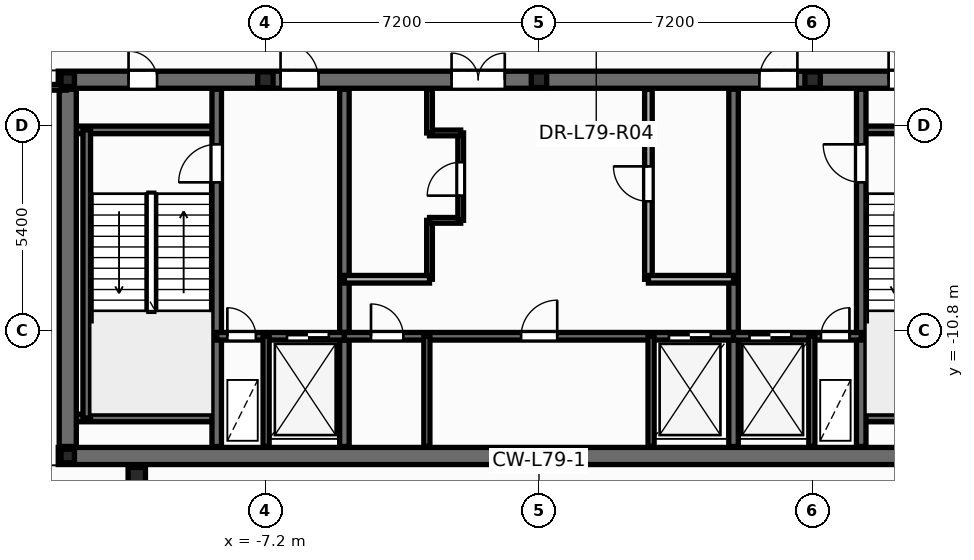
"""IFC4 building model, lengths in metres.
Left out: names, types, materials, properties, quantities, classifications, styles, units other than length and angle.
Written with IfcOpenShell. Run it as: python <this file> out.ifc"""

import sys

from ifc_helpers import new_model, si_unit, direction, frame, frame_2d, origin, origin_2d, place, context, subcontext, project, spatial, rectangle, hollow_circle, i_section, extrude, element, fill, save


model = new_model("IFC4")
c1 = context("Model", 3, precision=1e-05, world=origin(), true_north=direction((0.0, 1.0)))
c2 = subcontext(c1, "Body", "Model", "MODEL_VIEW")
j1 = project(units=[si_unit("LENGTHUNIT", "METRE"), si_unit("PLANEANGLEUNIT", "RADIAN")], contexts=[c1])
p1 = place(None, origin())
s1 = spatial("IfcSite", under=j1, at=p1, CompositionType="ELEMENT")
p2 = place(p1, origin())
s2 = spatial("IfcBuilding", under=s1, at=p2, CompositionType="ELEMENT")
p3 = place(p2, frame((0.0, 0.0, 301.8)))
s3 = spatial("IfcBuildingStorey", under=s2, at=p3, CompositionType="ELEMENT", Elevation=301.8)
p4 = place(p3, frame((-10.583, -14.63, 0.0), z_axis=(0.0, 0.0, 1.0), x_axis=(1.0, 0.0, 0.0)))
e1 = element("IfcColumn", 1, at=p4, inside=s3, PredefinedType="COLUMN", context=c2, shape_type="SweptSolid", body=[
    extrude(hollow_circle(Radius=0.229, WallThickness=0.016, at=origin_2d()), origin(), (0.0, 0.0, 1.0), 4.2),
])
for number, where, z_axis, x_axis in (
    (2, (-12.4, -14.1, 0.0), (0.0, 0.0, 1.0), (1.0, 0.0, 0.0)),
    (3, (-12.4, -4.2, 0.0), (0.0, 0.0, 1.0), (1.0, 0.0, 0.0)),
):
    element("IfcColumn", number, at=place(p3, frame(where, z_axis=z_axis, x_axis=x_axis)), inside=s3, PredefinedType="COLUMN", context=c2, shape_type="SweptSolid", body=[
        extrude(i_section(OverallWidth=0.352, OverallDepth=0.359, WebThickness=0.018, FlangeThickness=0.026, at=origin_2d()), origin(), (0.0, 0.0, 1.0), 4.2),
    ])
for number, where, z_axis, x_axis in (
    (4, (-7.2, -4.2, 0.0), (0.0, 0.0, 1.0), (1.0, 0.0, 0.0)),
    (5, (0.0, -4.2, 0.0), (0.0, 0.0, 1.0), (1.0, 0.0, 0.0)),
    (6, (7.2, -4.2, 0.0), (0.0, 0.0, 1.0), (1.0, 0.0, 0.0)),
):
    element("IfcColumn", number, at=place(p3, frame(where, z_axis=z_axis, x_axis=x_axis)), inside=s3, PredefinedType="PILASTER", context=c2, shape_type="SweptSolid", body=[
        extrude(i_section(OverallWidth=0.405, OverallDepth=0.414, WebThickness=0.022, FlangeThickness=0.032, at=origin_2d()), origin(), (0.0, 0.0, 1.0), 4.2),
    ])
p5 = place(p3, frame((-2.88, -9.45, 0.0), z_axis=(0.0, 0.0, 1.0), x_axis=(0.0, 1.0, 0.0)))
e7 = element("IfcWall", 7, at=p5, inside=s3, PredefinedType="PARTITIONING", context=c2, shape_type="SweptSolid", body=[
    extrude(rectangle(XDim=1.55, YDim=0.15, at=frame_2d((0.775, 0.0))), origin(), (0.0, 0.0, 1.0), 3.88),
])
p6 = place(p3, frame((-2.88, -7.9, 0.0), z_axis=(0.0, 0.0, 1.0), x_axis=(1.0, 0.0, 0.0)))
e8 = element("IfcWall", 8, at=p6, inside=s3, PredefinedType="PARTITIONING", context=c2, shape_type="SweptSolid", body=[
    extrude(rectangle(XDim=0.82, YDim=0.15, at=frame_2d((0.41, 0.0))), origin(), (0.0, 0.0, 1.0), 3.88),
])
p7 = place(p3, frame((-2.06, -7.9, 0.0), z_axis=(0.0, 0.0, 1.0), x_axis=(0.0, 1.0, 0.0)))
e9 = element("IfcWall", 9, at=p7, inside=s3, PredefinedType="PARTITIONING", context=c2, shape_type="SweptSolid", body=[
    extrude(rectangle(XDim=2.3, YDim=0.15, at=frame_2d((1.15, 0.0))), origin(), (0.0, 0.0, 1.0), 3.88),
])
p8 = place(p7, frame((0.65, 0.0, 0.0)))
e10 = element("IfcOpeningElement", 10, at=p8, cuts=e9, PredefinedType="OPENING", context=c2, shape_type="SweptSolid", body=[
    extrude(rectangle(XDim=0.886, YDim=2.104, at=frame_2d((0.44, 1.052))), frame((0.0, 0.085, 0.0), z_axis=(0.0, -1.0, 0.0), x_axis=(1.0, 0.0, 0.0)), (0.0, 0.0, 1.0), 0.17),
])
p9 = place(p3, frame((-2.88, -5.6, 0.0), z_axis=(0.0, 0.0, 1.0), x_axis=(1.0, 0.0, 0.0)))
e11 = element("IfcWall", 11, at=p9, inside=s3, PredefinedType="PARTITIONING", context=c2, shape_type="SweptSolid", body=[
    extrude(rectangle(XDim=0.82, YDim=0.15, at=frame_2d((0.41, 0.0))), origin(), (0.0, 0.0, 1.0), 3.88),
])
p10 = place(p3, frame((-2.88, -5.6, 0.0), z_axis=(0.0, 0.0, 1.0), x_axis=(0.0, 1.0, 0.0)))
e12 = element("IfcWall", 12, at=p10, inside=s3, PredefinedType="PARTITIONING", context=c2, shape_type="SweptSolid", body=[
    extrude(rectangle(XDim=1.15, YDim=0.15, at=frame_2d((0.575, 0.0))), origin(), (0.0, 0.0, 1.0), 3.88),
])
p11 = place(p3, frame((-12.65, -14.1, 0.0), z_axis=(0.0, 0.0, 1.0), x_axis=(1.0, 0.0, 0.0)))
e13 = element("IfcWall", 13, at=p11, inside=s3, PredefinedType="SHEAR", context=c2, shape_type="SweptSolid", body=[
    extrude(rectangle(XDim=25.3, YDim=0.45, at=frame_2d((12.65, 0.0))), origin(), (0.0, 0.0, 1.0), 4.2),
])
p12 = place(p3, frame((-12.65, -4.2, 0.0), z_axis=(0.0, 0.0, 1.0), x_axis=(1.0, 0.0, 0.0)))
e14 = element("IfcWall", 14, at=p12, inside=s3, PredefinedType="SHEAR", context=c2, shape_type="SweptSolid", body=[
    extrude(rectangle(XDim=25.3, YDim=0.45, at=frame_2d((12.65, 0.0))), origin(), (0.0, 0.0, 1.0), 4.2),
])
p13 = place(p12, frame((1.85, 0.0, 0.0)))
e15 = element("IfcOpeningElement", 15, at=p13, cuts=e14, PredefinedType="OPENING", context=c2, shape_type="SweptSolid", body=[
    extrude(rectangle(XDim=0.756, YDim=2.054, at=frame_2d((0.375, 1.027))), frame((0.0, 0.235, 0.0), z_axis=(0.0, -1.0, 0.0), x_axis=(1.0, 0.0, 0.0)), (0.0, 0.0, 1.0), 0.47),
])
p14 = place(p12, frame((21.85, 0.0, 0.0)))
e16 = element("IfcOpeningElement", 16, at=p14, cuts=e14, PredefinedType="OPENING", context=c2, shape_type="SweptSolid", body=[
    extrude(rectangle(XDim=0.756, YDim=2.054, at=frame_2d((0.375, 1.027))), frame((0.0, 0.235, 0.0), z_axis=(0.0, -1.0, 0.0), x_axis=(1.0, 0.0, 0.0)), (0.0, 0.0, 1.0), 0.47),
])
p15 = place(p12, frame((23.5, 0.0, 0.0)))
e17 = element("IfcOpeningElement", 17, at=p15, cuts=e14, PredefinedType="OPENING", context=c2, shape_type="SweptSolid", body=[
    extrude(rectangle(XDim=0.756, YDim=2.054, at=frame_2d((0.375, 1.027))), frame((0.0, 0.235, 0.0), z_axis=(0.0, -1.0, 0.0), x_axis=(1.0, 0.0, 0.0)), (0.0, 0.0, 1.0), 0.47),
])
p16 = place(p12, frame((5.85, 0.0, 0.0)))
e18 = element("IfcOpeningElement", 18, at=p16, cuts=e14, PredefinedType="OPENING", context=c2, shape_type="SweptSolid", body=[
    extrude(rectangle(XDim=1.006, YDim=2.104, at=frame_2d((0.5, 1.052))), frame((0.0, 0.235, 0.0), z_axis=(0.0, -1.0, 0.0), x_axis=(1.0, 0.0, 0.0)), (0.0, 0.0, 1.0), 0.47),
])
p17 = place(p12, frame((10.35, 0.0, 0.0)))
e19 = element("IfcOpeningElement", 19, at=p17, cuts=e14, PredefinedType="OPENING", context=c2, shape_type="SweptSolid", body=[
    extrude(rectangle(XDim=1.406, YDim=2.154, at=frame_2d((0.7, 1.077))), frame((0.0, 0.235, 0.0), z_axis=(0.0, -1.0, 0.0), x_axis=(1.0, 0.0, 0.0)), (0.0, 0.0, 1.0), 0.47),
])
p18 = place(p12, frame((18.45, 0.0, 0.0)))
e20 = element("IfcOpeningElement", 20, at=p18, cuts=e14, PredefinedType="OPENING", context=c2, shape_type="SweptSolid", body=[
    extrude(rectangle(XDim=1.006, YDim=2.104, at=frame_2d((0.5, 1.052))), frame((0.0, 0.235, 0.0), z_axis=(0.0, -1.0, 0.0), x_axis=(1.0, 0.0, 0.0)), (0.0, 0.0, 1.0), 0.47),
])
for number, where, z_axis, x_axis in (
    (21, (-12.35, -5.52, 0.0), (0.0, 0.0, 1.0), (1.0, 0.0, 0.0)),
    (22, (-12.35, -13.1, 0.0), (0.0, 0.0, 1.0), (1.0, 0.0, 0.0)),
):
    element("IfcWall", number, at=place(p3, frame(where, z_axis=z_axis, x_axis=x_axis)), inside=s3, PredefinedType="SOLIDWALL", context=c2, shape_type="SweptSolid", body=[
        extrude(rectangle(XDim=3.87, YDim=0.2, at=frame_2d((1.935, 0.0))), origin(), (0.0, 0.0, 1.0), 4.2),
    ])
p19 = place(p3, frame((-11.9, -13.1, 0.0), z_axis=(0.0, 0.0, 1.0), x_axis=(0.0, 1.0, 0.0)))
e23 = element("IfcWall", 23, at=p19, inside=s3, PredefinedType="SOLIDWALL", context=c2, shape_type="SweptSolid", body=[
    extrude(rectangle(XDim=7.58, YDim=0.2, at=frame_2d((3.79, 0.0))), origin(), (0.0, 0.0, 1.0), 4.2),
])
for number, where, z_axis, x_axis in (
    (24, (8.48, -5.52, 0.0), (0.0, 0.0, 1.0), (1.0, 0.0, 0.0)),
    (25, (8.48, -13.1, 0.0), (0.0, 0.0, 1.0), (1.0, 0.0, 0.0)),
):
    element("IfcWall", number, at=place(p3, frame(where, z_axis=z_axis, x_axis=x_axis)), inside=s3, PredefinedType="SOLIDWALL", context=c2, shape_type="SweptSolid", body=[
        extrude(rectangle(XDim=3.87, YDim=0.2, at=frame_2d((1.935, 0.0))), origin(), (0.0, 0.0, 1.0), 4.2),
    ])
p20 = place(p3, frame((-8.48, -13.85, 0.0), z_axis=(0.0, 0.0, 1.0), x_axis=(0.0, 1.0, 0.0)))
e26 = element("IfcWall", 26, at=p20, inside=s3, PredefinedType="SHEAR", context=c2, shape_type="SweptSolid", body=[
    extrude(rectangle(XDim=9.4, YDim=0.25, at=frame_2d((4.7, 0.0))), origin(), (0.0, 0.0, 1.0), 4.2),
])
p21 = place(p20, frame((6.95, 0.0, 0.0)))
e27 = element("IfcOpeningElement", 27, at=p21, cuts=e26, PredefinedType="OPENING", context=c2, shape_type="SweptSolid", body=[
    extrude(rectangle(XDim=1.006, YDim=2.104, at=frame_2d((0.5, 1.052))), frame((0.0, 0.135, 0.0), z_axis=(0.0, -1.0, 0.0), x_axis=(1.0, 0.0, 0.0)), (0.0, 0.0, 1.0), 0.27),
])
p22 = place(p3, frame((8.48, -13.85, 0.0), z_axis=(0.0, 0.0, 1.0), x_axis=(0.0, 1.0, 0.0)))
e28 = element("IfcWall", 28, at=p22, inside=s3, PredefinedType="SHEAR", context=c2, shape_type="SweptSolid", body=[
    extrude(rectangle(XDim=9.4, YDim=0.25, at=frame_2d((4.7, 0.0))), origin(), (0.0, 0.0, 1.0), 4.2),
])
p23 = place(p22, frame((6.95, 0.0, 0.0)))
e29 = element("IfcOpeningElement", 29, at=p23, cuts=e28, PredefinedType="OPENING", context=c2, shape_type="SweptSolid", body=[
    extrude(rectangle(XDim=1.006, YDim=2.104, at=frame_2d((0.5, 1.052))), frame((0.0, 0.135, 0.0), z_axis=(0.0, -1.0, 0.0), x_axis=(1.0, 0.0, 0.0)), (0.0, 0.0, 1.0), 0.27),
])
for number, where, z_axis, x_axis in (
    (30, (-5.12, -13.85, 0.0), (0.0, 0.0, 1.0), (0.0, 1.0, 0.0)),
    (31, (5.12, -13.85, 0.0), (0.0, 0.0, 1.0), (0.0, 1.0, 0.0)),
):
    element("IfcWall", number, at=place(p3, frame(where, z_axis=z_axis, x_axis=x_axis)), inside=s3, PredefinedType="SHEAR", context=c2, shape_type="SweptSolid", body=[
        extrude(rectangle(XDim=9.4, YDim=0.25, at=frame_2d((4.7, 0.0))), origin(), (0.0, 0.0, 1.0), 4.2),
    ])
p24 = place(p3, frame((-8.48, -10.95, 0.0), z_axis=(0.0, 0.0, 1.0), x_axis=(1.0, 0.0, 0.0)))
e32 = element("IfcWall", 32, at=p24, inside=s3, PredefinedType="SOLIDWALL", context=c2, shape_type="SweptSolid", body=[
    extrude(rectangle(XDim=3.36, YDim=0.2, at=frame_2d((1.68, 0.0))), origin(), (0.0, 0.0, 1.0), 4.2),
])
p25 = place(p24, frame((0.28, 0.0, 0.0)))
e33 = element("IfcOpeningElement", 33, at=p25, cuts=e32, PredefinedType="OPENING", context=c2, shape_type="SweptSolid", body=[
    extrude(rectangle(XDim=0.756, YDim=2.054, at=frame_2d((0.375, 1.027))), frame((0.0, 0.11, 0.0), z_axis=(0.0, -1.0, 0.0), x_axis=(1.0, 0.0, 0.0)), (0.0, 0.0, 1.0), 0.22),
])
p26 = place(p24, frame((1.85, 0.0, 0.0)))
e34 = element("IfcOpeningElement", 34, at=p26, cuts=e32, PredefinedType="OPENING", context=c2, shape_type="SweptSolid", body=[
    extrude(rectangle(XDim=1.106, YDim=2.104, at=frame_2d((0.55, 1.052))), frame((0.0, 0.11, 0.0), z_axis=(0.0, -1.0, 0.0), x_axis=(1.0, 0.0, 0.0)), (0.0, 0.0, 1.0), 0.22),
])
p27 = place(p3, frame((-5.12, -10.95, 0.0), z_axis=(0.0, 0.0, 1.0), x_axis=(1.0, 0.0, 0.0)))
e35 = element("IfcWall", 35, at=p27, inside=s3, PredefinedType="SOLIDWALL", context=c2, shape_type="SweptSolid", body=[
    extrude(rectangle(XDim=10.24, YDim=0.2, at=frame_2d((5.12, 0.0))), origin(), (0.0, 0.0, 1.0), 4.2),
])
p28 = place(p27, frame((0.7, 0.0, 0.0)))
e36 = element("IfcOpeningElement", 36, at=p28, cuts=e35, PredefinedType="OPENING", context=c2, shape_type="SweptSolid", body=[
    extrude(rectangle(XDim=0.856, YDim=2.054, at=frame_2d((0.425, 1.027))), frame((0.0, 0.11, 0.0), z_axis=(0.0, -1.0, 0.0), x_axis=(1.0, 0.0, 0.0)), (0.0, 0.0, 1.0), 0.22),
])
p29 = place(p27, frame((4.65, 0.0, 0.0)))
e37 = element("IfcOpeningElement", 37, at=p29, cuts=e35, PredefinedType="OPENING", context=c2, shape_type="SweptSolid", body=[
    extrude(rectangle(XDim=0.956, YDim=2.104, at=frame_2d((0.475, 1.052))), frame((0.0, 0.11, 0.0), z_axis=(0.0, -1.0, 0.0), x_axis=(1.0, 0.0, 0.0)), (0.0, 0.0, 1.0), 0.22),
])
p30 = place(p27, frame((8.54, 0.0, 0.0)))
e38 = element("IfcOpeningElement", 38, at=p30, cuts=e35, PredefinedType="OPENING", context=c2, shape_type="SweptSolid", body=[
    extrude(rectangle(XDim=1.106, YDim=2.104, at=frame_2d((0.55, 1.052))), frame((0.0, 0.11, 0.0), z_axis=(0.0, -1.0, 0.0), x_axis=(1.0, 0.0, 0.0)), (0.0, 0.0, 1.0), 0.22),
])
p31 = place(p3, frame((5.12, -10.95, 0.0), z_axis=(0.0, 0.0, 1.0), x_axis=(1.0, 0.0, 0.0)))
e39 = element("IfcWall", 39, at=p31, inside=s3, PredefinedType="SOLIDWALL", context=c2, shape_type="SweptSolid", body=[
    extrude(rectangle(XDim=3.36, YDim=0.2, at=frame_2d((1.68, 0.0))), origin(), (0.0, 0.0, 1.0), 4.2),
])
p32 = place(p31, frame((0.42, 0.0, 0.0)))
e40 = element("IfcOpeningElement", 40, at=p32, cuts=e39, PredefinedType="OPENING", context=c2, shape_type="SweptSolid", body=[
    extrude(rectangle(XDim=1.106, YDim=2.104, at=frame_2d((0.55, 1.052))), frame((0.0, 0.11, 0.0), z_axis=(0.0, -1.0, 0.0), x_axis=(1.0, 0.0, 0.0)), (0.0, 0.0, 1.0), 0.22),
])
p33 = place(p31, frame((2.3, 0.0, 0.0)))
e41 = element("IfcOpeningElement", 41, at=p33, cuts=e39, PredefinedType="OPENING", context=c2, shape_type="SweptSolid", body=[
    extrude(rectangle(XDim=0.756, YDim=2.054, at=frame_2d((0.375, 1.027))), frame((0.0, 0.11, 0.0), z_axis=(0.0, -1.0, 0.0), x_axis=(1.0, 0.0, 0.0)), (0.0, 0.0, 1.0), 0.22),
])
for number, where, z_axis, x_axis in (
    (42, (-7.18, -13.85, 0.0), (0.0, 0.0, 1.0), (0.0, 1.0, 0.0)),
    (43, (7.18, -13.85, 0.0), (0.0, 0.0, 1.0), (0.0, 1.0, 0.0)),
    (44, (-2.95, -13.85, 0.0), (0.0, 0.0, 1.0), (0.0, 1.0, 0.0)),
    (45, (2.95, -13.85, 0.0), (0.0, 0.0, 1.0), (0.0, 1.0, 0.0)),
):
    element("IfcWall", number, at=place(p3, frame(where, z_axis=z_axis, x_axis=x_axis)), inside=s3, PredefinedType="PARTITIONING", context=c2, shape_type="SweptSolid", body=[
        extrude(rectangle(XDim=2.9, YDim=0.16, at=frame_2d((1.45, 0.0))), origin(), (0.0, 0.0, 1.0), 3.105),
    ])
p34 = place(p3, frame((-12.4, -13.85, 0.0), z_axis=(0.0, 0.0, 1.0), x_axis=(0.0, 1.0, 0.0)))
e46 = element("IfcWall", 46, at=p34, inside=s3, PredefinedType="SHEAR", context=c2, shape_type="SweptSolid", body=[
    extrude(rectangle(XDim=9.4, YDim=0.45, at=frame_2d((4.7, 0.0))), origin(), (0.0, 0.0, 1.0), 4.2),
])
p35 = place(p3, frame((-5.12, -9.45, 0.0), z_axis=(0.0, 0.0, 1.0), x_axis=(1.0, 0.0, 0.0)))
e47 = element("IfcWall", 47, at=p35, inside=s3, PredefinedType="SOLIDWALL", context=c2, shape_type="SweptSolid", body=[
    extrude(rectangle(XDim=2.24, YDim=0.2, at=frame_2d((1.12, 0.0))), origin(), (0.0, 0.0, 1.0), 3.88),
])
p36 = place(p3, frame((2.88, -9.45, 0.0), z_axis=(0.0, 0.0, 1.0), x_axis=(0.0, 1.0, 0.0)))
e48 = element("IfcWall", 48, at=p36, inside=s3, PredefinedType="SOLIDWALL", context=c2, shape_type="SweptSolid", body=[
    extrude(rectangle(XDim=5.0, YDim=0.2, at=frame_2d((2.5, 0.0))), origin(), (0.0, 0.0, 1.0), 3.88),
])
p37 = place(p36, frame((2.05, 0.0, 0.0)))
e49 = element("IfcOpeningElement", 49, at=p37, cuts=e48, PredefinedType="OPENING", context=c2, shape_type="SweptSolid", body=[
    extrude(rectangle(XDim=0.926, YDim=2.104, at=frame_2d((0.46, 1.052))), frame((0.0, 0.11, 0.0), z_axis=(0.0, -1.0, 0.0), x_axis=(1.0, 0.0, 0.0)), (0.0, 0.0, 1.0), 0.22),
])
p38 = place(p3, frame((2.88, -9.45, 0.0), z_axis=(0.0, 0.0, 1.0), x_axis=(1.0, 0.0, 0.0)))
e50 = element("IfcWall", 50, at=p38, inside=s3, PredefinedType="SOLIDWALL", context=c2, shape_type="SweptSolid", body=[
    extrude(rectangle(XDim=2.24, YDim=0.2, at=frame_2d((1.12, 0.0))), origin(), (0.0, 0.0, 1.0), 3.88),
])
p39 = place(p3, frame((-15.083, -4.4, 0.0), z_axis=(0.0, 0.0, 1.0), x_axis=(1.0, 0.0, 0.0)))
e51 = element("IfcWall", 51, at=p39, inside=s3, PredefinedType="PARTITIONING", context=c2, shape_type="SweptSolid", body=[
    extrude(rectangle(XDim=2.644, YDim=0.15, at=frame_2d((1.322, 0.0))), origin(), (0.0, 0.0, 1.0), 2.855),
])
p40 = place(p39, frame((0.1, 0.0, 0.0)))
e52 = element("IfcOpeningElement", 52, at=p40, cuts=e51, PredefinedType="OPENING", context=c2, shape_type="SweptSolid", body=[
    extrude(rectangle(XDim=0.906, YDim=2.104, at=frame_2d((0.45, 1.052))), frame((0.0, 0.085, 0.0), z_axis=(0.0, -1.0, 0.0), x_axis=(1.0, 0.0, 0.0)), (0.0, 0.0, 1.0), 0.17),
])
p41 = place(p8, origin())
e53 = element("IfcDoor", 53, at=p41, inside=s3, OperationType="SINGLE_SWING_LEFT", PredefinedType="DOOR", context=c2, shape_type="SweptSolid", body=[
    extrude(rectangle(XDim=0.88, YDim=2.1, at=frame_2d((0.44, 1.05))), frame((0.0, 0.025, 0.0), z_axis=(0.0, -1.0, 0.0), x_axis=(1.0, 0.0, 0.0)), (0.0, 0.0, 1.0), 0.05),
])
fill(e10, e53)
p42 = place(p37, origin())
e54 = element("IfcDoor", 54, at=p42, inside=s3, OperationType="SINGLE_SWING_RIGHT", PredefinedType="DOOR", context=c2, shape_type="SweptSolid", body=[
    extrude(rectangle(XDim=0.92, YDim=2.1, at=frame_2d((0.46, 1.05))), frame((0.0, 0.025, 0.0), z_axis=(0.0, -1.0, 0.0), x_axis=(1.0, 0.0, 0.0)), (0.0, 0.0, 1.0), 0.05),
])
fill(e49, e54)
p43 = place(p21, origin())
e55 = element("IfcDoor", 55, at=p43, inside=s3, OperationType="SINGLE_SWING_LEFT", PredefinedType="DOOR", context=c2, shape_type="SweptSolid", body=[
    extrude(rectangle(XDim=1.0, YDim=2.1, at=frame_2d((0.5, 1.05))), frame((0.0, 0.025, 0.0), z_axis=(0.0, -1.0, 0.0), x_axis=(1.0, 0.0, 0.0)), (0.0, 0.0, 1.0), 0.05),
])
fill(e27, e55)
p44 = place(p23, origin())
e56 = element("IfcDoor", 56, at=p44, inside=s3, OperationType="SINGLE_SWING_RIGHT", PredefinedType="DOOR", context=c2, shape_type="SweptSolid", body=[
    extrude(rectangle(XDim=1.0, YDim=2.1, at=frame_2d((0.5, 1.05))), frame((0.0, 0.025, 0.0), z_axis=(0.0, -1.0, 0.0), x_axis=(1.0, 0.0, 0.0)), (0.0, 0.0, 1.0), 0.05),
])
fill(e29, e56)
p45 = place(p25, origin())
e57 = element("IfcDoor", 57, at=p45, inside=s3, OperationType="SINGLE_SWING_LEFT", PredefinedType="DOOR", context=c2, shape_type="SweptSolid", body=[
    extrude(rectangle(XDim=0.75, YDim=2.05, at=frame_2d((0.375, 1.025))), frame((0.0, 0.025, 0.0), z_axis=(0.0, -1.0, 0.0), x_axis=(1.0, 0.0, 0.0)), (0.0, 0.0, 1.0), 0.05),
])
fill(e33, e57)
p46 = place(p26, origin())
e58 = element("IfcDoor", 58, at=p46, inside=s3, OperationType="DOUBLE_DOOR_SLIDING", PredefinedType="DOOR", context=c2, shape_type="SweptSolid", body=[
    extrude(rectangle(XDim=1.1, YDim=2.1, at=frame_2d((0.55, 1.05))), frame((0.0, 0.025, 0.0), z_axis=(0.0, -1.0, 0.0), x_axis=(1.0, 0.0, 0.0)), (0.0, 0.0, 1.0), 0.05),
])
fill(e34, e58)
p47 = place(p32, origin())
e59 = element("IfcDoor", 59, at=p47, inside=s3, OperationType="DOUBLE_DOOR_SLIDING", PredefinedType="DOOR", context=c2, shape_type="SweptSolid", body=[
    extrude(rectangle(XDim=1.1, YDim=2.1, at=frame_2d((0.55, 1.05))), frame((0.0, 0.025, 0.0), z_axis=(0.0, -1.0, 0.0), x_axis=(1.0, 0.0, 0.0)), (0.0, 0.0, 1.0), 0.05),
])
fill(e40, e59)
p48 = place(p33, origin())
e60 = element("IfcDoor", 60, at=p48, inside=s3, OperationType="SINGLE_SWING_RIGHT", PredefinedType="DOOR", context=c2, shape_type="SweptSolid", body=[
    extrude(rectangle(XDim=0.75, YDim=2.05, at=frame_2d((0.375, 1.025))), frame((0.0, 0.025, 0.0), z_axis=(0.0, -1.0, 0.0), x_axis=(1.0, 0.0, 0.0)), (0.0, 0.0, 1.0), 0.05),
])
fill(e41, e60)
p49 = place(p28, origin())
e61 = element("IfcDoor", 61, at=p49, inside=s3, OperationType="SINGLE_SWING_LEFT", PredefinedType="DOOR", context=c2, shape_type="SweptSolid", body=[
    extrude(rectangle(XDim=0.85, YDim=2.05, at=frame_2d((0.425, 1.025))), frame((0.0, 0.025, 0.0), z_axis=(0.0, -1.0, 0.0), x_axis=(1.0, 0.0, 0.0)), (0.0, 0.0, 1.0), 0.05),
])
fill(e36, e61)
p50 = place(p29, origin())
e62 = element("IfcDoor", 62, at=p50, inside=s3, OperationType="SINGLE_SWING_RIGHT", PredefinedType="DOOR", context=c2, shape_type="SweptSolid", body=[
    extrude(rectangle(XDim=0.95, YDim=2.1, at=frame_2d((0.475, 1.05))), frame((0.0, 0.025, 0.0), z_axis=(0.0, -1.0, 0.0), x_axis=(1.0, 0.0, 0.0)), (0.0, 0.0, 1.0), 0.05),
])
fill(e37, e62)
p51 = place(p30, origin())
e63 = element("IfcDoor", 63, at=p51, inside=s3, OperationType="DOUBLE_DOOR_SLIDING", PredefinedType="DOOR", context=c2, shape_type="SweptSolid", body=[
    extrude(rectangle(XDim=1.1, YDim=2.1, at=frame_2d((0.55, 1.05))), frame((0.0, 0.025, 0.0), z_axis=(0.0, -1.0, 0.0), x_axis=(1.0, 0.0, 0.0)), (0.0, 0.0, 1.0), 0.05),
])
fill(e38, e63)
p52 = place(p13, origin())
e64 = element("IfcDoor", 64, at=p52, inside=s3, OperationType="SINGLE_SWING_LEFT", PredefinedType="DOOR", context=c2, shape_type="SweptSolid", body=[
    extrude(rectangle(XDim=0.75, YDim=2.05, at=frame_2d((0.375, 1.025))), frame((0.0, 0.025, 0.0), z_axis=(0.0, -1.0, 0.0), x_axis=(1.0, 0.0, 0.0)), (0.0, 0.0, 1.0), 0.05),
])
fill(e15, e64)
p53 = place(p14, origin())
e65 = element("IfcDoor", 65, at=p53, inside=s3, OperationType="SINGLE_SWING_LEFT", PredefinedType="DOOR", context=c2, shape_type="SweptSolid", body=[
    extrude(rectangle(XDim=0.75, YDim=2.05, at=frame_2d((0.375, 1.025))), frame((0.0, 0.025, 0.0), z_axis=(0.0, -1.0, 0.0), x_axis=(1.0, 0.0, 0.0)), (0.0, 0.0, 1.0), 0.05),
])
fill(e16, e65)
p54 = place(p16, origin())
e66 = element("IfcDoor", 66, at=p54, inside=s3, OperationType="SINGLE_SWING_LEFT", PredefinedType="DOOR", context=c2, shape_type="SweptSolid", body=[
    extrude(rectangle(XDim=1.0, YDim=2.1, at=frame_2d((0.5, 1.05))), frame((0.0, 0.025, 0.0), z_axis=(0.0, -1.0, 0.0), x_axis=(1.0, 0.0, 0.0)), (0.0, 0.0, 1.0), 0.05),
])
fill(e18, e66)
p55 = place(p17, origin())
e67 = element("IfcDoor", 67, at=p55, inside=s3, OperationType="DOUBLE_DOOR_SINGLE_SWING", PredefinedType="DOOR", context=c2, shape_type="SweptSolid", body=[
    extrude(rectangle(XDim=1.4, YDim=2.15, at=frame_2d((0.7, 1.075))), frame((0.0, 0.025, 0.0), z_axis=(0.0, -1.0, 0.0), x_axis=(1.0, 0.0, 0.0)), (0.0, 0.0, 1.0), 0.05),
])
fill(e19, e67)
p56 = place(p18, origin())
e68 = element("IfcDoor", 68, at=p56, inside=s3, OperationType="SINGLE_SWING_RIGHT", PredefinedType="DOOR", context=c2, shape_type="SweptSolid", body=[
    extrude(rectangle(XDim=1.0, YDim=2.1, at=frame_2d((0.5, 1.05))), frame((0.0, 0.025, 0.0), z_axis=(0.0, -1.0, 0.0), x_axis=(1.0, 0.0, 0.0)), (0.0, 0.0, 1.0), 0.05),
])
fill(e20, e68)
save(model, sys.argv[1])
